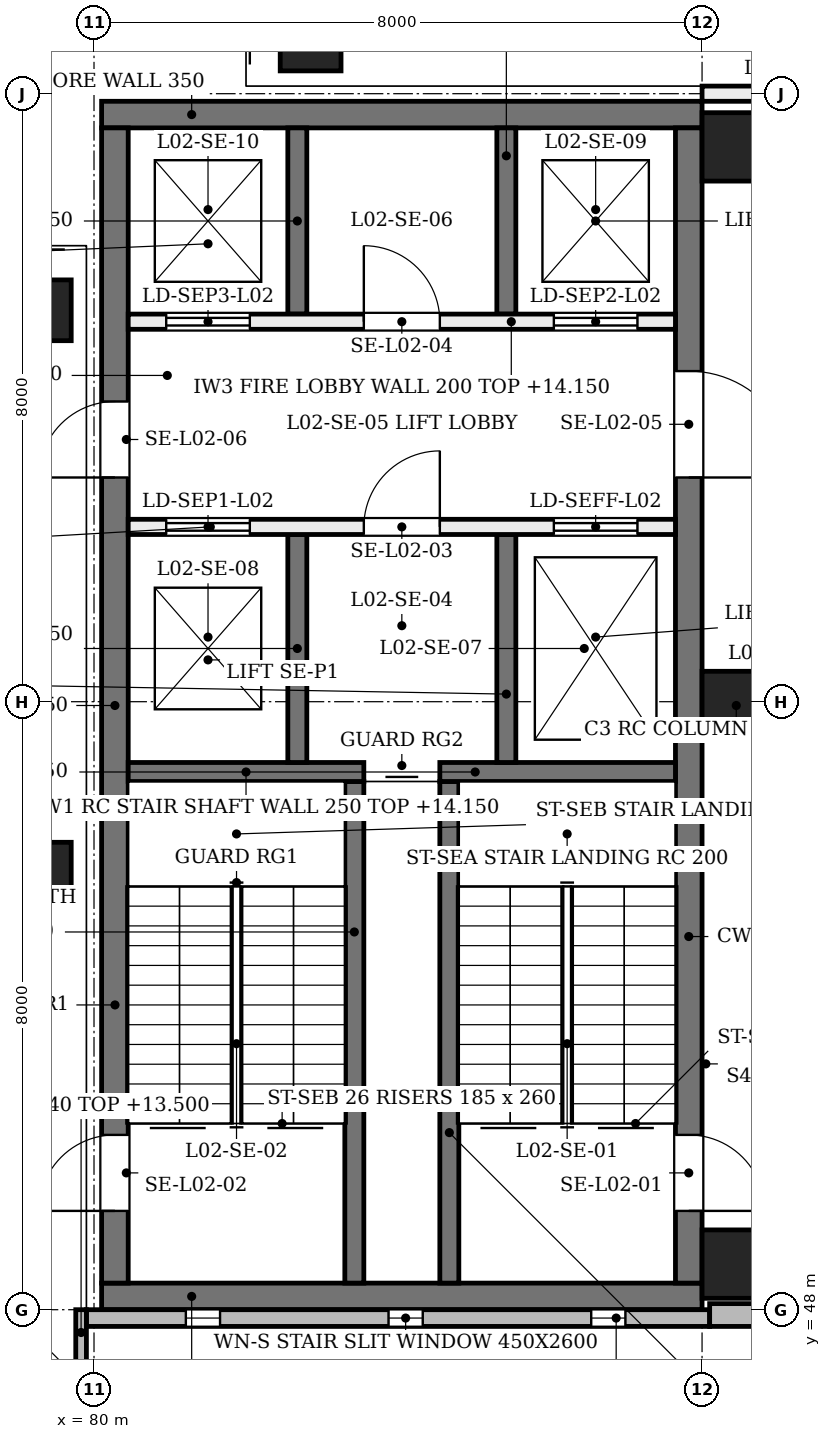
"""IFC4 building model, lengths in metres.
Left out: names, types, materials, properties, quantities, classifications, styles, units other than length and angle.
Written with IfcOpenShell. Run it as: python <this file> out.ifc"""

import sys

from ifc_helpers import new_model, si_unit, direction, frame, frame_2d, origin, origin_2d, place, context, subcontext, project, spatial, rectangle, extrude, element, fill, save


model = new_model("IFC4")
c1 = context("Model", 3, precision=1e-05, world=origin(), true_north=direction((0.0, 1.0)))
c2 = subcontext(c1, "Body", "Model", "MODEL_VIEW")
j1 = project(units=[si_unit("LENGTHUNIT", "METRE"), si_unit("PLANEANGLEUNIT", "RADIAN")], contexts=[c1])
p1 = place(None, origin())
s1 = spatial("IfcSite", under=j1, at=p1, CompositionType="ELEMENT")
p2 = place(p1, origin())
s2 = spatial("IfcBuilding", under=s1, at=p2, CompositionType="ELEMENT")
p3 = place(p2, frame((0.0, 0.0, 9.6)))
s3 = spatial("IfcBuildingStorey", under=s2, at=p3, CompositionType="ELEMENT", Elevation=9.6)
for number, where, z_axis, x_axis in (
    (1, (80.1, 48.175, 0.0), (0.0, 0.0, 1.0), (1.0, 0.0, 0.0)),
    (2, (80.1, 63.725, 0.0), (0.0, 0.0, 1.0), (1.0, 0.0, 0.0)),
):
    element("IfcWall", number, at=place(p3, frame(where, z_axis=z_axis, x_axis=x_axis)), inside=s3, PredefinedType="SHEAR", context=c2, shape_type="SweptSolid", body=[
        extrude(rectangle(XDim=7.9, YDim=0.35, at=frame_2d((3.95, 0.0))), origin(), (0.0, 0.0, 1.0), 4.58),
    ])
p4 = place(p3, frame((80.275, 48.35, 0.0), z_axis=(0.0, 0.0, 1.0), x_axis=(0.0, 1.0, 0.0)))
e3 = element("IfcWall", 3, at=p4, inside=s3, PredefinedType="SHEAR", context=c2, shape_type="SweptSolid", body=[
    extrude(rectangle(XDim=15.2, YDim=0.35, at=frame_2d((7.6, 0.0))), origin(), (0.0, 0.0, 1.0), 4.58),
])
p5 = place(p4, frame((0.95, 0.0, 0.0)))
e4 = element("IfcOpeningElement", 4, at=p5, cuts=e3, PredefinedType="OPENING", context=c2, shape_type="SweptSolid", body=[
    extrude(rectangle(XDim=1.0, YDim=2.1, at=frame_2d((0.5, 1.05))), frame((0.0, 0.185, 0.0), z_axis=(0.0, -1.0, 0.0), x_axis=(1.0, 0.0, 0.0)), (0.0, 0.0, 1.0), 0.37),
])
p6 = place(p4, frame((10.6, 0.0, 0.0)))
e5 = element("IfcOpeningElement", 5, at=p6, cuts=e3, PredefinedType="OPENING", context=c2, shape_type="SweptSolid", body=[
    extrude(rectangle(XDim=1.0, YDim=2.1, at=frame_2d((0.5, 1.05))), frame((0.0, 0.185, 0.0), z_axis=(0.0, -1.0, 0.0), x_axis=(1.0, 0.0, 0.0)), (0.0, 0.0, 1.0), 0.37),
])
p7 = place(p3, frame((87.825, 48.35, 0.0), z_axis=(0.0, 0.0, 1.0), x_axis=(0.0, 1.0, 0.0)))
e6 = element("IfcWall", 6, at=p7, inside=s3, PredefinedType="SHEAR", context=c2, shape_type="SweptSolid", body=[
    extrude(rectangle(XDim=15.2, YDim=0.35, at=frame_2d((7.6, 0.0))), origin(), (0.0, 0.0, 1.0), 4.58),
])
p8 = place(p7, frame((0.95, 0.0, 0.0)))
e7 = element("IfcOpeningElement", 7, at=p8, cuts=e6, PredefinedType="OPENING", context=c2, shape_type="SweptSolid", body=[
    extrude(rectangle(XDim=1.0, YDim=2.1, at=frame_2d((0.5, 1.05))), frame((0.0, 0.185, 0.0), z_axis=(0.0, -1.0, 0.0), x_axis=(1.0, 0.0, 0.0)), (0.0, 0.0, 1.0), 0.37),
])
p9 = place(p7, frame((10.6, 0.0, 0.0)))
e8 = element("IfcOpeningElement", 8, at=p9, cuts=e6, PredefinedType="OPENING", context=c2, shape_type="SweptSolid", body=[
    extrude(rectangle(XDim=1.4, YDim=2.1, at=frame_2d((0.7, 1.05))), frame((0.0, 0.185, 0.0), z_axis=(0.0, -1.0, 0.0), x_axis=(1.0, 0.0, 0.0)), (0.0, 0.0, 1.0), 0.37),
])
for number, where, z_axis, x_axis in (
    (9, (88.45, 48.6, 0.0), (0.0, 0.0, 1.0), (1.0, 0.0, 0.0)),
    (10, (88.45, 55.95, 0.0), (0.0, 0.0, 1.0), (1.0, 0.0, 0.0)),
    (11, (88.45, 63.3, 0.0), (0.0, 0.0, 1.0), (1.0, 0.0, 0.0)),
):
    element("IfcColumn", number, at=place(p3, frame(where, z_axis=z_axis, x_axis=x_axis)), inside=s3, PredefinedType="COLUMN", context=c2, shape_type="SweptSolid", body=[
        extrude(rectangle(XDim=0.9, YDim=0.9, at=origin_2d()), origin(), (0.0, 0.0, 1.0), 4.8),
    ])
for number, where, z_axis, x_axis in (
    (12, (79.3, 54.0, 0.0), (0.0, -0.204, 0.979), (1.0, 0.0, 0.0)),
    (13, (79.3, 61.4, 0.0), (0.0, -0.204, 0.979), (1.0, 0.0, 0.0)),
    (14, (82.6, 64.7, 0.0), (0.204, 0.0, 0.979), (0.0, 1.0, 0.0)),
):
    element("IfcColumn", number, at=place(p3, frame(where, z_axis=z_axis, x_axis=x_axis)), inside=s3, PredefinedType="COLUMN", context=c2, shape_type="SweptSolid", body=[
        extrude(rectangle(XDim=0.8, YDim=0.8, at=origin_2d()), origin(), (0.0, 0.0, 1.0), 4.903),
    ])
p10 = place(p3, frame((79.9, 47.89, 0.0), z_axis=(0.0, 0.0, 1.0), x_axis=(1.0, 0.0, 0.0)))
e15 = element("IfcWall", 15, at=p10, inside=s3, PredefinedType="SOLIDWALL", context=c2, shape_type="SweptSolid", body=[
    extrude(rectangle(XDim=8.2, YDim=0.22, at=frame_2d((4.1, 0.0))), origin(), (0.0, 0.0, 1.0), 3.9),
])
p11 = place(p10, frame((1.308, 0.0, 0.9)))
e16 = element("IfcOpeningElement", 16, at=p11, cuts=e15, PredefinedType="OPENING", context=c2, shape_type="SweptSolid", body=[
    extrude(rectangle(XDim=0.45, YDim=2.6, at=frame_2d((0.225, 1.3))), frame((0.0, 0.12, 0.0), z_axis=(0.0, -1.0, 0.0), x_axis=(1.0, 0.0, 0.0)), (0.0, 0.0, 1.0), 0.24),
])
p12 = place(p10, frame((3.975, 0.0, 0.9)))
e17 = element("IfcOpeningElement", 17, at=p12, cuts=e15, PredefinedType="OPENING", context=c2, shape_type="SweptSolid", body=[
    extrude(rectangle(XDim=0.45, YDim=2.6, at=frame_2d((0.225, 1.3))), frame((0.0, 0.12, 0.0), z_axis=(0.0, -1.0, 0.0), x_axis=(1.0, 0.0, 0.0)), (0.0, 0.0, 1.0), 0.24),
])
p13 = place(p10, frame((6.642, 0.0, 0.9)))
e18 = element("IfcOpeningElement", 18, at=p13, cuts=e15, PredefinedType="OPENING", context=c2, shape_type="SweptSolid", body=[
    extrude(rectangle(XDim=0.45, YDim=2.6, at=frame_2d((0.225, 1.3))), frame((0.0, 0.12, 0.0), z_axis=(0.0, -1.0, 0.0), x_axis=(1.0, 0.0, 0.0)), (0.0, 0.0, 1.0), 0.24),
])
p14 = place(p3, frame((88.1, 47.93, 0.0), z_axis=(0.0, 0.0, 1.0), x_axis=(1.0, 0.0, 0.0)))
e19 = element("IfcWall", 19, at=p14, inside=s3, PredefinedType="SOLIDWALL", context=c2, shape_type="SweptSolid", body=[
    extrude(rectangle(XDim=7.9, YDim=0.3, at=frame_2d((3.95, 0.0))), origin(), (0.0, 0.0, 1.0), 3.9),
])
p15 = place(p14, frame((0.717, 0.0, 0.75)))
e20 = element("IfcOpeningElement", 20, at=p15, cuts=e19, PredefinedType="OPENING", context=c2, shape_type="SweptSolid", body=[
    extrude(rectangle(XDim=1.2, YDim=3.1, at=frame_2d((0.6, 1.55))), frame((0.0, 0.16, 0.0), z_axis=(0.0, -1.0, 0.0), x_axis=(1.0, 0.0, 0.0)), (0.0, 0.0, 1.0), 0.32),
])
p16 = place(p14, frame((3.35, 0.0, 0.75)))
e21 = element("IfcOpeningElement", 21, at=p16, cuts=e19, PredefinedType="OPENING", context=c2, shape_type="SweptSolid", body=[
    extrude(rectangle(XDim=1.2, YDim=3.1, at=frame_2d((0.6, 1.55))), frame((0.0, 0.16, 0.0), z_axis=(0.0, -1.0, 0.0), x_axis=(1.0, 0.0, 0.0)), (0.0, 0.0, 1.0), 0.32),
])
p17 = place(p14, frame((5.983, 0.0, 0.75)))
e22 = element("IfcOpeningElement", 22, at=p17, cuts=e19, PredefinedType="OPENING", context=c2, shape_type="SweptSolid", body=[
    extrude(rectangle(XDim=1.2, YDim=3.1, at=frame_2d((0.6, 1.55))), frame((0.0, 0.16, 0.0), z_axis=(0.0, -1.0, 0.0), x_axis=(1.0, 0.0, 0.0)), (0.0, 0.0, 1.0), 0.32),
])
p18 = place(p3, frame((79.83, 46.0, 0.0), z_axis=(0.0, 0.0, 1.0), x_axis=(0.0, 1.0, 0.0)))
e23 = element("IfcWall", 23, at=p18, inside=s3, PredefinedType="SOLIDWALL", context=c2, shape_type="SweptSolid", body=[
    extrude(rectangle(XDim=2.0, YDim=0.14, at=frame_2d((1.0, 0.0))), origin(), (0.0, 0.0, 1.0), 3.9),
])
for number, where, z_axis, x_axis in (
    (24, (84.675, 48.35, 0.0), (0.0, 0.0, 1.0), (0.0, 1.0, 0.0)),
    (25, (83.425, 48.35, 0.0), (0.0, 0.0, 1.0), (0.0, 1.0, 0.0)),
):
    element("IfcWall", number, at=place(p3, frame(where, z_axis=z_axis, x_axis=x_axis)), inside=s3, PredefinedType="SOLIDWALL", context=c2, shape_type="SweptSolid", body=[
        extrude(rectangle(XDim=6.6, YDim=0.25, at=frame_2d((3.3, 0.0))), origin(), (0.0, 0.0, 1.0), 4.55),
    ])
p19 = place(p3, frame((87.65, 55.075, 0.0), z_axis=(0.0, 0.0, 1.0), x_axis=(-1.0, 0.0, 0.0)))
e26 = element("IfcWall", 26, at=p19, inside=s3, PredefinedType="SOLIDWALL", context=c2, shape_type="SweptSolid", body=[
    extrude(rectangle(XDim=3.1, YDim=0.25, at=frame_2d((1.55, 0.0))), origin(), (0.0, 0.0, 1.0), 4.55),
])
p20 = place(p3, frame((83.55, 55.075, 0.0), z_axis=(0.0, 0.0, 1.0), x_axis=(-1.0, 0.0, 0.0)))
e27 = element("IfcWall", 27, at=p20, inside=s3, PredefinedType="SOLIDWALL", context=c2, shape_type="SweptSolid", body=[
    extrude(rectangle(XDim=3.1, YDim=0.25, at=frame_2d((1.55, 0.0))), origin(), (0.0, 0.0, 1.0), 4.55),
])
p21 = place(p3, frame((85.425, 55.2, 0.0), z_axis=(0.0, 0.0, 1.0), x_axis=(0.0, 1.0, 0.0)))
e28 = element("IfcWall", 28, at=p21, inside=s3, PredefinedType="SOLIDWALL", context=c2, shape_type="SweptSolid", body=[
    extrude(rectangle(XDim=3.0, YDim=0.25, at=frame_2d((1.5, 0.0))), origin(), (0.0, 0.0, 1.0), 4.55),
])
p22 = place(p3, frame((85.425, 61.1, 0.0), z_axis=(0.0, 0.0, 1.0), x_axis=(0.0, 1.0, 0.0)))
e29 = element("IfcWall", 29, at=p22, inside=s3, PredefinedType="SOLIDWALL", context=c2, shape_type="SweptSolid", body=[
    extrude(rectangle(XDim=2.45, YDim=0.25, at=frame_2d((1.225, 0.0))), origin(), (0.0, 0.0, 1.0), 4.55),
])
p23 = place(p3, frame((82.675, 55.2, 0.0), z_axis=(0.0, 0.0, 1.0), x_axis=(0.0, 1.0, 0.0)))
e30 = element("IfcWall", 30, at=p23, inside=s3, PredefinedType="SOLIDWALL", context=c2, shape_type="SweptSolid", body=[
    extrude(rectangle(XDim=3.0, YDim=0.25, at=frame_2d((1.5, 0.0))), origin(), (0.0, 0.0, 1.0), 4.55),
])
p24 = place(p3, frame((82.675, 61.1, 0.0), z_axis=(0.0, 0.0, 1.0), x_axis=(0.0, 1.0, 0.0)))
e31 = element("IfcWall", 31, at=p24, inside=s3, PredefinedType="SOLIDWALL", context=c2, shape_type="SweptSolid", body=[
    extrude(rectangle(XDim=2.45, YDim=0.25, at=frame_2d((1.225, 0.0))), origin(), (0.0, 0.0, 1.0), 4.55),
])
p25 = place(p3, frame((87.65, 58.3, 0.0), z_axis=(0.0, 0.0, 1.0), x_axis=(-1.0, 0.0, 0.0)))
e32 = element("IfcWall", 32, at=p25, inside=s3, PredefinedType="SOLIDWALL", context=c2, shape_type="SweptSolid", body=[
    extrude(rectangle(XDim=7.2, YDim=0.2, at=frame_2d((3.6, 0.0))), origin(), (0.0, 0.0, 1.0), 4.55),
])
p26 = place(p25, frame((0.5, 0.0, 0.0)))
e33 = element("IfcOpeningElement", 33, at=p26, cuts=e32, PredefinedType="OPENING", context=c2, shape_type="SweptSolid", body=[
    extrude(rectangle(XDim=1.1, YDim=2.1, at=frame_2d((0.55, 1.05))), frame((0.0, 0.11, 0.0), z_axis=(0.0, -1.0, 0.0), x_axis=(1.0, 0.0, 0.0)), (0.0, 0.0, 1.0), 0.22),
])
p27 = place(p25, frame((5.6, 0.0, 0.0)))
e34 = element("IfcOpeningElement", 34, at=p27, cuts=e32, PredefinedType="OPENING", context=c2, shape_type="SweptSolid", body=[
    extrude(rectangle(XDim=1.1, YDim=2.1, at=frame_2d((0.55, 1.05))), frame((0.0, 0.11, 0.0), z_axis=(0.0, -1.0, 0.0), x_axis=(1.0, 0.0, 0.0)), (0.0, 0.0, 1.0), 0.22),
])
p28 = place(p25, frame((3.1, 0.0, 0.0)))
e35 = element("IfcOpeningElement", 35, at=p28, cuts=e32, PredefinedType="OPENING", context=c2, shape_type="SweptSolid", body=[
    extrude(rectangle(XDim=1.0, YDim=2.1, at=frame_2d((0.5, 1.05))), frame((0.0, 0.11, 0.0), z_axis=(0.0, -1.0, 0.0), x_axis=(1.0, 0.0, 0.0)), (0.0, 0.0, 1.0), 0.22),
])
p29 = place(p3, frame((87.65, 61.0, 0.0), z_axis=(0.0, 0.0, 1.0), x_axis=(-1.0, 0.0, 0.0)))
e36 = element("IfcWall", 36, at=p29, inside=s3, PredefinedType="SOLIDWALL", context=c2, shape_type="SweptSolid", body=[
    extrude(rectangle(XDim=7.2, YDim=0.2, at=frame_2d((3.6, 0.0))), origin(), (0.0, 0.0, 1.0), 4.55),
])
p30 = place(p29, frame((0.5, 0.0, 0.0)))
e37 = element("IfcOpeningElement", 37, at=p30, cuts=e36, PredefinedType="OPENING", context=c2, shape_type="SweptSolid", body=[
    extrude(rectangle(XDim=1.1, YDim=2.1, at=frame_2d((0.55, 1.05))), frame((0.0, 0.11, 0.0), z_axis=(0.0, -1.0, 0.0), x_axis=(1.0, 0.0, 0.0)), (0.0, 0.0, 1.0), 0.22),
])
p31 = place(p29, frame((5.6, 0.0, 0.0)))
e38 = element("IfcOpeningElement", 38, at=p31, cuts=e36, PredefinedType="OPENING", context=c2, shape_type="SweptSolid", body=[
    extrude(rectangle(XDim=1.1, YDim=2.1, at=frame_2d((0.55, 1.05))), frame((0.0, 0.11, 0.0), z_axis=(0.0, -1.0, 0.0), x_axis=(1.0, 0.0, 0.0)), (0.0, 0.0, 1.0), 0.22),
])
p32 = place(p29, frame((3.1, 0.0, 0.0)))
e39 = element("IfcOpeningElement", 39, at=p32, cuts=e36, PredefinedType="OPENING", context=c2, shape_type="SweptSolid", body=[
    extrude(rectangle(XDim=1.0, YDim=2.1, at=frame_2d((0.5, 1.05))), frame((0.0, 0.11, 0.0), z_axis=(0.0, -1.0, 0.0), x_axis=(1.0, 0.0, 0.0)), (0.0, 0.0, 1.0), 0.22),
])
p33 = place(p3, frame((88.0, 64.0, 0.0), z_axis=(0.0, 0.0, 1.0), x_axis=(1.0, 0.0, 0.0)))
e40 = element("IfcWall", 40, at=p33, inside=s3, PredefinedType="PARTITIONING", context=c2, shape_type="SweptSolid", body=[
    extrude(rectangle(XDim=3.6, YDim=0.2, at=frame_2d((1.8, 0.0))), origin(), (0.0, 0.0, 1.0), 3.88),
])
p34 = place(p33, frame((0.9, 0.0, 0.0)))
e41 = element("IfcOpeningElement", 41, at=p34, cuts=e40, PredefinedType="OPENING", context=c2, shape_type="SweptSolid", body=[
    extrude(rectangle(XDim=0.9, YDim=2.1, at=frame_2d((0.45, 1.05))), frame((0.0, 0.11, 0.0), z_axis=(0.0, -1.0, 0.0), x_axis=(1.0, 0.0, 0.0)), (0.0, 0.0, 1.0), 0.22),
])
p35 = place(p11, origin())
e42 = element("IfcWindow", 42, at=p35, inside=s3, PartitioningType="SINGLE_PANEL", PredefinedType="WINDOW", context=c2, shape_type="SweptSolid", body=[
    extrude(rectangle(XDim=0.45, YDim=2.6, at=frame_2d((0.225, 1.3))), frame((0.0, 0.03, 0.0), z_axis=(0.0, -1.0, 0.0), x_axis=(1.0, 0.0, 0.0)), (0.0, 0.0, 1.0), 0.06),
])
fill(e16, e42)
p36 = place(p12, origin())
e43 = element("IfcWindow", 43, at=p36, inside=s3, PartitioningType="SINGLE_PANEL", PredefinedType="WINDOW", context=c2, shape_type="SweptSolid", body=[
    extrude(rectangle(XDim=0.45, YDim=2.6, at=frame_2d((0.225, 1.3))), frame((0.0, 0.03, 0.0), z_axis=(0.0, -1.0, 0.0), x_axis=(1.0, 0.0, 0.0)), (0.0, 0.0, 1.0), 0.06),
])
fill(e17, e43)
p37 = place(p13, origin())
e44 = element("IfcWindow", 44, at=p37, inside=s3, PartitioningType="SINGLE_PANEL", PredefinedType="WINDOW", context=c2, shape_type="SweptSolid", body=[
    extrude(rectangle(XDim=0.45, YDim=2.6, at=frame_2d((0.225, 1.3))), frame((0.0, 0.03, 0.0), z_axis=(0.0, -1.0, 0.0), x_axis=(1.0, 0.0, 0.0)), (0.0, 0.0, 1.0), 0.06),
])
fill(e18, e44)
p38 = place(p8, frame((1.0, 0.0, 0.0), z_axis=(0.0, 0.0, 1.0), x_axis=(-1.0, 0.0, 0.0)))
e45 = element("IfcDoor", 45, at=p38, inside=s3, OperationType="SINGLE_SWING_LEFT", PredefinedType="DOOR", context=c2, shape_type="SweptSolid", body=[
    extrude(rectangle(XDim=1.0, YDim=2.1, at=frame_2d((0.5, 1.05))), frame((0.0, 0.025, 0.0), z_axis=(0.0, -1.0, 0.0), x_axis=(1.0, 0.0, 0.0)), (0.0, 0.0, 1.0), 0.05),
])
fill(e7, e45)
p39 = place(p5, origin())
e46 = element("IfcDoor", 46, at=p39, inside=s3, OperationType="SINGLE_SWING_LEFT", PredefinedType="DOOR", context=c2, shape_type="SweptSolid", body=[
    extrude(rectangle(XDim=1.0, YDim=2.1, at=frame_2d((0.5, 1.05))), frame((0.0, 0.025, 0.0), z_axis=(0.0, -1.0, 0.0), x_axis=(1.0, 0.0, 0.0)), (0.0, 0.0, 1.0), 0.05),
])
fill(e4, e46)
p40 = place(p26, frame((1.1, 0.0, 0.0), z_axis=(0.0, 0.0, 1.0), x_axis=(-1.0, 0.0, 0.0)))
e47 = element("IfcDoor", 47, at=p40, inside=s3, OperationType="DOUBLE_DOOR_SLIDING", PredefinedType="DOOR", context=c2, shape_type="SweptSolid", body=[
    extrude(rectangle(XDim=1.1, YDim=2.1, at=frame_2d((0.55, 1.05))), frame((0.0, 0.025, 0.0), z_axis=(0.0, -1.0, 0.0), x_axis=(1.0, 0.0, 0.0)), (0.0, 0.0, 1.0), 0.05),
])
fill(e33, e47)
p41 = place(p27, frame((1.1, 0.0, 0.0), z_axis=(0.0, 0.0, 1.0), x_axis=(-1.0, 0.0, 0.0)))
e48 = element("IfcDoor", 48, at=p41, inside=s3, OperationType="DOUBLE_DOOR_SLIDING", PredefinedType="DOOR", context=c2, shape_type="SweptSolid", body=[
    extrude(rectangle(XDim=1.1, YDim=2.1, at=frame_2d((0.55, 1.05))), frame((0.0, 0.025, 0.0), z_axis=(0.0, -1.0, 0.0), x_axis=(1.0, 0.0, 0.0)), (0.0, 0.0, 1.0), 0.05),
])
fill(e34, e48)
p42 = place(p30, origin())
e49 = element("IfcDoor", 49, at=p42, inside=s3, OperationType="DOUBLE_DOOR_SLIDING", PredefinedType="DOOR", context=c2, shape_type="SweptSolid", body=[
    extrude(rectangle(XDim=1.1, YDim=2.1, at=frame_2d((0.55, 1.05))), frame((0.0, 0.025, 0.0), z_axis=(0.0, -1.0, 0.0), x_axis=(1.0, 0.0, 0.0)), (0.0, 0.0, 1.0), 0.05),
])
fill(e37, e49)
p43 = place(p31, origin())
e50 = element("IfcDoor", 50, at=p43, inside=s3, OperationType="DOUBLE_DOOR_SLIDING", PredefinedType="DOOR", context=c2, shape_type="SweptSolid", body=[
    extrude(rectangle(XDim=1.1, YDim=2.1, at=frame_2d((0.55, 1.05))), frame((0.0, 0.025, 0.0), z_axis=(0.0, -1.0, 0.0), x_axis=(1.0, 0.0, 0.0)), (0.0, 0.0, 1.0), 0.05),
])
fill(e38, e50)
p44 = place(p28, frame((1.0, 0.0, 0.0), z_axis=(0.0, 0.0, 1.0), x_axis=(-1.0, 0.0, 0.0)))
e51 = element("IfcDoor", 51, at=p44, inside=s3, OperationType="SINGLE_SWING_LEFT", PredefinedType="DOOR", context=c2, shape_type="SweptSolid", body=[
    extrude(rectangle(XDim=1.0, YDim=2.1, at=frame_2d((0.5, 1.05))), frame((0.0, 0.025, 0.0), z_axis=(0.0, -1.0, 0.0), x_axis=(1.0, 0.0, 0.0)), (0.0, 0.0, 1.0), 0.05),
])
fill(e35, e51)
p45 = place(p32, origin())
e52 = element("IfcDoor", 52, at=p45, inside=s3, OperationType="SINGLE_SWING_RIGHT", PredefinedType="DOOR", context=c2, shape_type="SweptSolid", body=[
    extrude(rectangle(XDim=1.0, YDim=2.1, at=frame_2d((0.5, 1.05))), frame((0.0, 0.025, 0.0), z_axis=(0.0, -1.0, 0.0), x_axis=(1.0, 0.0, 0.0)), (0.0, 0.0, 1.0), 0.05),
])
fill(e39, e52)
p46 = place(p9, frame((1.4, 0.0, 0.0), z_axis=(0.0, 0.0, 1.0), x_axis=(-1.0, 0.0, 0.0)))
e53 = element("IfcDoor", 53, at=p46, inside=s3, OperationType="SINGLE_SWING_LEFT", PredefinedType="DOOR", context=c2, shape_type="SweptSolid", body=[
    extrude(rectangle(XDim=1.4, YDim=2.1, at=frame_2d((0.7, 1.05))), frame((0.0, 0.025, 0.0), z_axis=(0.0, -1.0, 0.0), x_axis=(1.0, 0.0, 0.0)), (0.0, 0.0, 1.0), 0.05),
])
fill(e8, e53)
p47 = place(p6, origin())
e54 = element("IfcDoor", 54, at=p47, inside=s3, OperationType="SINGLE_SWING_LEFT", PredefinedType="DOOR", context=c2, shape_type="SweptSolid", body=[
    extrude(rectangle(XDim=1.0, YDim=2.1, at=frame_2d((0.5, 1.05))), frame((0.0, 0.025, 0.0), z_axis=(0.0, -1.0, 0.0), x_axis=(1.0, 0.0, 0.0)), (0.0, 0.0, 1.0), 0.05),
])
fill(e5, e54)
save(model, sys.argv[1])
